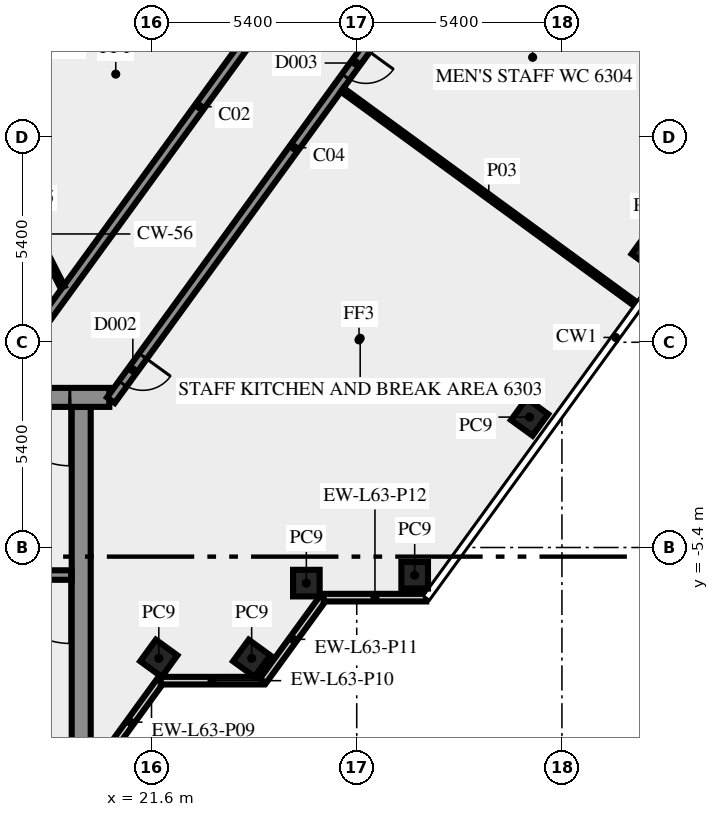
"""IFC4 building model, lengths in metres.
Left out: names, types, materials, properties, quantities, classifications, styles, units other than length and angle.
Written with IfcOpenShell. Run it as: python <this file> out.ifc"""

import sys

from ifc_helpers import new_model, si_unit, direction, frame, frame_2d, origin, origin_2d, place, context, subcontext, project, spatial, rectangle, extrude, element, fill, save


model = new_model("IFC4")
c1 = context("Model", 3, precision=1e-05, world=origin(), true_north=direction((0.0, 1.0)))
c2 = subcontext(c1, "Body", "Model", "MODEL_VIEW")
j1 = project(units=[si_unit("LENGTHUNIT", "METRE"), si_unit("PLANEANGLEUNIT", "RADIAN")], contexts=[c1])
p1 = place(None, origin())
s1 = spatial("IfcSite", under=j1, at=p1, CompositionType="ELEMENT")
p2 = place(p1, origin())
s2 = spatial("IfcBuilding", under=s1, at=p2, CompositionType="ELEMENT")
p3 = place(p2, frame((0.0, 0.0, 269.0)))
s3 = spatial("IfcBuildingStorey", under=s2, at=p3, CompositionType="ELEMENT", Elevation=269.0)
for number, where, z_axis, x_axis in (
    (1, (21.792, -8.315, 0.0), (0.0, 0.0, 1.0), (0.588, 0.809, 0.0)),
    (2, (24.235, -8.315, 0.0), (0.0, 0.0, 1.0), (0.588, 0.809, 0.0)),
    (3, (25.674, -6.337, 0.0), (0.0, 0.0, 1.0), (1.0, 0.0, 0.0)),
    (4, (28.525, -6.13, 0.0), (0.0, 0.0, 1.0), (1.0, 0.0, 0.0)),
    (5, (31.548, -1.969, 0.0), (0.0, 0.0, 1.0), (0.588, 0.809, 0.0)),
    (6, (34.722, 2.4, 0.0), (0.0, 0.0, 1.0), (0.588, 0.809, 0.0)),
):
    element("IfcColumn", number, at=place(p3, frame(where, z_axis=z_axis, x_axis=x_axis)), inside=s3, PredefinedType="COLUMN", context=c2, shape_type="SweptSolid", body=[
        extrude(rectangle(XDim=0.7, YDim=0.7, at=origin_2d()), origin(), (0.0, 0.0, 1.0), 3.5),
    ])
p4 = place(p3, frame((20.253, -11.083, 0.0), z_axis=(0.0, 0.0, 1.0), x_axis=(0.587766567315, 0.809030569476, 0.0)))
e7 = element("IfcWall", 7, at=p4, inside=s3, PredefinedType="SOLIDWALL", context=c2, shape_type="SweptSolid", body=[
    extrude(rectangle(XDim=2.688, YDim=0.2, at=frame_2d((1.344, 0.0))), origin(), (0.0, 0.0, 1.0), 3.5),
])
p5 = place(p3, frame((21.843, -8.904, 0.0), z_axis=(0.0, 0.0, 1.0), x_axis=(1.0, 0.0, 0.0)))
e8 = element("IfcWall", 8, at=p5, inside=s3, PredefinedType="SOLIDWALL", context=c2, shape_type="SweptSolid", body=[
    extrude(rectangle(XDim=2.7, YDim=0.2, at=frame_2d((1.35, 0.0))), origin(), (0.0, 0.0, 1.0), 3.5),
])
p6 = place(p3, frame((24.533, -8.909, 0.0), z_axis=(0.0, 0.0, 1.0), x_axis=(0.587720002413, 0.809064397168, 0.0)))
e9 = element("IfcWall", 9, at=p6, inside=s3, PredefinedType="SOLIDWALL", context=c2, shape_type="SweptSolid", body=[
    extrude(rectangle(XDim=2.7, YDim=0.2, at=frame_2d((1.35, 0.0))), origin(), (0.0, 0.0, 1.0), 3.5),
])
p7 = place(p3, frame((26.13, -6.719, 0.0), z_axis=(0.0, 0.0, 1.0), x_axis=(1.0, 0.0, 0.0)))
e10 = element("IfcWall", 10, at=p7, inside=s3, PredefinedType="SOLIDWALL", context=c2, shape_type="SweptSolid", body=[
    extrude(rectangle(XDim=2.7, YDim=0.2, at=frame_2d((1.35, 0.0))), origin(), (0.0, 0.0, 1.0), 3.5),
])
p8 = place(p3, frame((19.75, -10.5, 0.0), z_axis=(0.0, 0.0, 1.0), x_axis=(0.0, 1.0, 0.0)))
e11 = element("IfcWall", 11, at=p8, inside=s3, PredefinedType="SHEAR", context=c2, shape_type="SweptSolid", body=[
    extrude(rectangle(XDim=8.8, YDim=0.5, at=frame_2d((4.4, 0.0))), origin(), (0.0, 0.0, 1.0), 3.5),
])
p9 = place(p3, frame((19.5, -6.125, 0.0), z_axis=(0.0, 0.0, 1.0), x_axis=(-1.0, 0.0, 0.0)))
e12 = element("IfcWall", 12, at=p9, inside=s3, PredefinedType="SHEAR", context=c2, shape_type="SweptSolid", body=[
    extrude(rectangle(XDim=8.05, YDim=0.25, at=frame_2d((4.025, 0.0))), origin(), (0.0, 0.0, 1.0), 3.5),
])
p10 = place(p9, frame((0.05, 0.0, 0.0)))
e13 = element("IfcOpeningElement", 13, at=p10, cuts=e12, PredefinedType="OPENING", context=c2, shape_type="SweptSolid", body=[
    extrude(rectangle(XDim=1.8, YDim=2.1, at=frame_2d((0.9, 1.05))), frame((0.0, 0.135, 0.0), z_axis=(0.0, -1.0, 0.0), x_axis=(1.0, 0.0, 0.0)), (0.0, 0.0, 1.0), 0.27),
])
p11 = place(p3, frame((20.49, -1.45, 0.0), z_axis=(0.0, 0.0, 1.0), x_axis=(-1.0, 0.0, 0.0)))
e14 = element("IfcWall", 14, at=p11, inside=s3, PredefinedType="SHEAR", context=c2, shape_type="SweptSolid", body=[
    extrude(rectangle(XDim=40.98, YDim=0.5, at=frame_2d((20.49, 0.0))), origin(), (0.0, 0.0, 1.0), 3.5),
])
p12 = place(p11, frame((38.14, 0.0, 0.0)))
e15 = element("IfcOpeningElement", 15, at=p12, cuts=e14, PredefinedType="OPENING", context=c2, shape_type="SweptSolid", body=[
    extrude(rectangle(XDim=1.8, YDim=2.1, at=frame_2d((0.9, 1.05))), frame((0.0, 0.26, 0.0), z_axis=(0.0, -1.0, 0.0), x_axis=(1.0, 0.0, 0.0)), (0.0, 0.0, 1.0), 0.52),
])
p13 = place(p11, frame((36.728, 0.0, 0.0)))
e16 = element("IfcOpeningElement", 16, at=p13, cuts=e14, PredefinedType="OPENING", context=c2, shape_type="SweptSolid", body=[
    extrude(rectangle(XDim=0.8, YDim=2.1, at=frame_2d((0.4, 1.05))), frame((0.0, 0.26, 0.0), z_axis=(0.0, -1.0, 0.0), x_axis=(1.0, 0.0, 0.0)), (0.0, 0.0, 1.0), 0.52),
])
p14 = place(p11, frame((35.153, 0.0, 0.0)))
e17 = element("IfcOpeningElement", 17, at=p14, cuts=e14, PredefinedType="OPENING", context=c2, shape_type="SweptSolid", body=[
    extrude(rectangle(XDim=0.8, YDim=2.1, at=frame_2d((0.4, 1.05))), frame((0.0, 0.26, 0.0), z_axis=(0.0, -1.0, 0.0), x_axis=(1.0, 0.0, 0.0)), (0.0, 0.0, 1.0), 0.52),
])
p15 = place(p11, frame((32.94, 0.0, 0.0)))
e18 = element("IfcOpeningElement", 18, at=p15, cuts=e14, PredefinedType="OPENING", context=c2, shape_type="SweptSolid", body=[
    extrude(rectangle(XDim=0.9, YDim=2.1, at=frame_2d((0.45, 1.05))), frame((0.0, 0.26, 0.0), z_axis=(0.0, -1.0, 0.0), x_axis=(1.0, 0.0, 0.0)), (0.0, 0.0, 1.0), 0.52),
])
p16 = place(p11, frame((31.015, 0.0, 0.0)))
e19 = element("IfcOpeningElement", 19, at=p16, cuts=e14, PredefinedType="OPENING", context=c2, shape_type="SweptSolid", body=[
    extrude(rectangle(XDim=0.8, YDim=2.1, at=frame_2d((0.4, 1.05))), frame((0.0, 0.26, 0.0), z_axis=(0.0, -1.0, 0.0), x_axis=(1.0, 0.0, 0.0)), (0.0, 0.0, 1.0), 0.52),
])
p17 = place(p11, frame((24.765, 0.0, 0.0)))
e20 = element("IfcOpeningElement", 20, at=p17, cuts=e14, PredefinedType="OPENING", context=c2, shape_type="SweptSolid", body=[
    extrude(rectangle(XDim=0.8, YDim=2.1, at=frame_2d((0.4, 1.05))), frame((0.0, 0.26, 0.0), z_axis=(0.0, -1.0, 0.0), x_axis=(1.0, 0.0, 0.0)), (0.0, 0.0, 1.0), 0.52),
])
p18 = place(p11, frame((19.59, 0.0, 0.0)))
e21 = element("IfcOpeningElement", 21, at=p18, cuts=e14, PredefinedType="OPENING", context=c2, shape_type="SweptSolid", body=[
    extrude(rectangle(XDim=2.0, YDim=2.1, at=frame_2d((1.0, 1.05))), frame((0.0, 0.26, 0.0), z_axis=(0.0, -1.0, 0.0), x_axis=(1.0, 0.0, 0.0)), (0.0, 0.0, 1.0), 0.52),
])
p19 = place(p11, frame((13.202, 0.0, 0.0)))
e22 = element("IfcOpeningElement", 22, at=p19, cuts=e14, PredefinedType="OPENING", context=c2, shape_type="SweptSolid", body=[
    extrude(rectangle(XDim=0.9, YDim=2.1, at=frame_2d((0.45, 1.05))), frame((0.0, 0.26, 0.0), z_axis=(0.0, -1.0, 0.0), x_axis=(1.0, 0.0, 0.0)), (0.0, 0.0, 1.0), 0.52),
])
p20 = place(p11, frame((9.478, 0.0, 0.0)))
e23 = element("IfcOpeningElement", 23, at=p20, cuts=e14, PredefinedType="OPENING", context=c2, shape_type="SweptSolid", body=[
    extrude(rectangle(XDim=0.9, YDim=2.1, at=frame_2d((0.45, 1.05))), frame((0.0, 0.26, 0.0), z_axis=(0.0, -1.0, 0.0), x_axis=(1.0, 0.0, 0.0)), (0.0, 0.0, 1.0), 0.52),
])
p21 = place(p11, frame((7.14, 0.0, 0.0)))
e24 = element("IfcOpeningElement", 24, at=p21, cuts=e14, PredefinedType="OPENING", context=c2, shape_type="SweptSolid", body=[
    extrude(rectangle(XDim=0.9, YDim=2.1, at=frame_2d((0.45, 1.05))), frame((0.0, 0.26, 0.0), z_axis=(0.0, -1.0, 0.0), x_axis=(1.0, 0.0, 0.0)), (0.0, 0.0, 1.0), 0.52),
])
p22 = place(p11, frame((4.19, 0.0, 0.0)))
e25 = element("IfcOpeningElement", 25, at=p22, cuts=e14, PredefinedType="OPENING", context=c2, shape_type="SweptSolid", body=[
    extrude(rectangle(XDim=0.9, YDim=2.1, at=frame_2d((0.45, 1.05))), frame((0.0, 0.26, 0.0), z_axis=(0.0, -1.0, 0.0), x_axis=(1.0, 0.0, 0.0)), (0.0, 0.0, 1.0), 0.52),
])
p23 = place(p11, frame((1.04, 0.0, 0.0)))
e26 = element("IfcOpeningElement", 26, at=p23, cuts=e14, PredefinedType="OPENING", context=c2, shape_type="SweptSolid", body=[
    extrude(rectangle(XDim=1.8, YDim=2.1, at=frame_2d((0.9, 1.05))), frame((0.0, 0.26, 0.0), z_axis=(0.0, -1.0, 0.0), x_axis=(1.0, 0.0, 0.0)), (0.0, 0.0, 1.0), 0.52),
])
p24 = place(p3, frame((17.545, -1.125, 0.0), z_axis=(0.0, 0.0, 1.0), x_axis=(0.58779555165, 0.809009511354, 0.0)))
e27 = element("IfcWall", 27, at=p24, inside=s3, PredefinedType="SOLIDWALL", context=c2, shape_type="SweptSolid", body=[
    extrude(rectangle(XDim=18.103, YDim=0.25, at=frame_2d((9.052, 0.0))), origin(), (0.0, 0.0, 1.0), 3.5),
])
p25 = place(p24, frame((16.728, 0.0, 0.0)))
e28 = element("IfcOpeningElement", 28, at=p25, cuts=e27, PredefinedType="OPENING", context=c2, shape_type="SweptSolid", body=[
    extrude(rectangle(XDim=0.9, YDim=2.1, at=frame_2d((0.45, 1.05))), frame((0.0, 0.135, 0.0), z_axis=(0.0, -1.0, 0.0), x_axis=(1.0, 0.0, 0.0)), (0.0, 0.0, 1.0), 0.27),
])
p26 = place(p3, frame((30.183, 11.761, 0.0), z_axis=(0.0, 0.0, 1.0), x_axis=(-0.587781762867, -0.80901952958, 0.0)))
e29 = element("IfcWall", 29, at=p26, inside=s3, PredefinedType="SOLIDWALL", context=c2, shape_type="SweptSolid", body=[
    extrude(rectangle(XDim=16.42, YDim=0.25, at=frame_2d((8.21, 0.0))), origin(), (0.0, 0.0, 1.0), 3.5),
])
p27 = place(p26, frame((5.005, 0.0, 0.0)))
e30 = element("IfcOpeningElement", 30, at=p27, cuts=e29, PredefinedType="OPENING", context=c2, shape_type="SweptSolid", body=[
    extrude(rectangle(XDim=0.9, YDim=2.1, at=frame_2d((0.45, 1.05))), frame((0.0, 0.135, 0.0), z_axis=(0.0, -1.0, 0.0), x_axis=(1.0, 0.0, 0.0)), (0.0, 0.0, 1.0), 0.27),
])
p28 = place(p26, frame((14.988, 0.0, 0.0)))
e31 = element("IfcOpeningElement", 31, at=p28, cuts=e29, PredefinedType="OPENING", context=c2, shape_type="SweptSolid", body=[
    extrude(rectangle(XDim=0.9, YDim=2.1, at=frame_2d((0.45, 1.05))), frame((0.0, 0.135, 0.0), z_axis=(0.0, -1.0, 0.0), x_axis=(1.0, 0.0, 0.0)), (0.0, 0.0, 1.0), 0.27),
])
p29 = place(p3, frame((37.458, 6.76, 0.0), z_axis=(0.0, 0.0, 1.0), x_axis=(-0.809016295501, 0.587786214209, 0.0)))
e32 = element("IfcWall", 32, at=p29, inside=s3, PredefinedType="PARTITIONING", context=c2, shape_type="SweptSolid", body=[
    extrude(rectangle(XDim=8.7, YDim=0.15, at=frame_2d((4.35, 0.0))), origin(), (0.0, 0.0, 1.0), 3.5),
])
p30 = place(p3, frame((26.619, 6.643, 0.0), z_axis=(0.0, 0.0, 1.0), x_axis=(0.807594822539, -0.589737740532, 0.0)))
e33 = element("IfcWall", 33, at=p30, inside=s3, PredefinedType="PARTITIONING", context=c2, shape_type="SweptSolid", body=[
    extrude(rectangle(XDim=9.55, YDim=0.12, at=frame_2d((4.775, 0.0))), origin(), (0.0, 0.0, 1.0), 2.8),
])
p31 = place(p3, frame((18.0, 3.925, 0.0), z_axis=(0.0, 0.0, 1.0), x_axis=(0.453950796792, -0.891026752736, 0.0)))
e34 = element("IfcWall", 34, at=p31, inside=s3, PredefinedType="PARTITIONING", context=c2, shape_type="SweptSolid", body=[
    extrude(rectangle(XDim=2.778, YDim=0.12, at=frame_2d((1.389, 0.0))), origin(), (0.0, 0.0, 1.0), 3.5),
])
p32 = place(p10, origin())
e35 = element("IfcDoor", 35, at=p32, inside=s3, OperationType="DOUBLE_DOOR_SINGLE_SWING", PredefinedType="DOOR", context=c2, shape_type="SweptSolid", body=[
    extrude(rectangle(XDim=1.8, YDim=2.1, at=frame_2d((0.9, 1.05))), frame((0.0, 0.025, 0.0), z_axis=(0.0, -1.0, 0.0), x_axis=(1.0, 0.0, 0.0)), (0.0, 0.0, 1.0), 0.05),
])
fill(e13, e35)
p33 = place(p23, origin())
e36 = element("IfcDoor", 36, at=p33, inside=s3, OperationType="DOUBLE_DOOR_SINGLE_SWING", PredefinedType="DOOR", context=c2, shape_type="SweptSolid", body=[
    extrude(rectangle(XDim=1.8, YDim=2.1, at=frame_2d((0.9, 1.05))), frame((0.0, 0.025, 0.0), z_axis=(0.0, -1.0, 0.0), x_axis=(1.0, 0.0, 0.0)), (0.0, 0.0, 1.0), 0.05),
])
fill(e26, e36)
p34 = place(p27, origin())
e37 = element("IfcDoor", 37, at=p34, inside=s3, OperationType="SINGLE_SWING_RIGHT", PredefinedType="DOOR", context=c2, shape_type="SweptSolid", body=[
    extrude(rectangle(XDim=0.9, YDim=2.1, at=frame_2d((0.45, 1.05))), frame((0.0, 0.025, 0.0), z_axis=(0.0, -1.0, 0.0), x_axis=(1.0, 0.0, 0.0)), (0.0, 0.0, 1.0), 0.05),
])
fill(e30, e37)
p35 = place(p28, origin())
e38 = element("IfcDoor", 38, at=p35, inside=s3, OperationType="SINGLE_SWING_RIGHT", PredefinedType="DOOR", context=c2, shape_type="SweptSolid", body=[
    extrude(rectangle(XDim=0.9, YDim=2.1, at=frame_2d((0.45, 1.05))), frame((0.0, 0.025, 0.0), z_axis=(0.0, -1.0, 0.0), x_axis=(1.0, 0.0, 0.0)), (0.0, 0.0, 1.0), 0.05),
])
fill(e31, e38)
save(model, sys.argv[1])
